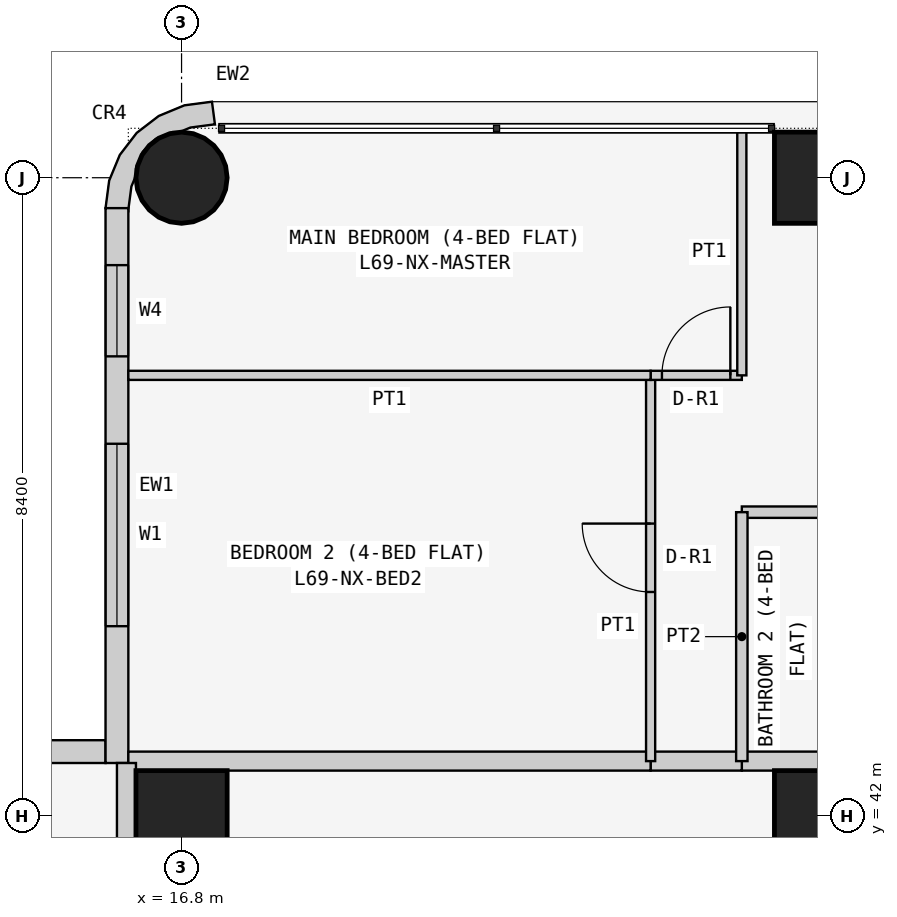
"""IFC4 building model, lengths in metres.
Left out: names, types, materials, properties, quantities, classifications, styles, units other than length and angle.
Written with IfcOpenShell. Run it as: python <this file> out.ifc"""

import sys

from ifc_helpers import new_model, si_unit, direction, frame, frame_2d, origin, origin_2d, place, context, subcontext, project, spatial, polyline, rectangle, circle, outline, extrude, element, fill, save


model = new_model("IFC4")
c1 = context("Model", 3, precision=1e-05, world=origin(), true_north=direction((0.0, 1.0)))
c2 = subcontext(c1, "Body", "Model", "MODEL_VIEW")
j1 = project(units=[si_unit("LENGTHUNIT", "METRE"), si_unit("PLANEANGLEUNIT", "RADIAN")], contexts=[c1])
p1 = place(None, origin())
s1 = spatial("IfcSite", under=j1, at=p1, CompositionType="ELEMENT")
p2 = place(p1, origin())
s2 = spatial("IfcBuilding", under=s1, at=p2, CompositionType="ELEMENT")
p3 = place(p2, frame((0.0, 0.0, 264.9)))
s3 = spatial("IfcBuildingStorey", under=s2, at=p3, CompositionType="ELEMENT", Elevation=264.9)
p4 = place(p3, frame((16.8, 42.0, 0.0), z_axis=(0.0, 0.0, 1.0), x_axis=(1.0, 0.0, 0.0)))
e1 = element("IfcColumn", 1, at=p4, inside=s3, PredefinedType="COLUMN", context=c2, shape_type="SweptSolid", body=[
    extrude(rectangle(XDim=1.2, YDim=1.2, at=origin_2d()), origin(), (0.0, 0.0, 1.0), 3.6),
])
p5 = place(p3, frame((16.8, 50.4, 0.0), z_axis=(0.0, 0.0, 1.0), x_axis=(1.0, 0.0, 0.0)))
e2 = element("IfcColumn", 2, at=p5, inside=s3, PredefinedType="COLUMN", context=c2, shape_type="SweptSolid", body=[
    extrude(circle(Radius=0.6, at=origin_2d()), origin(), (0.0, 0.0, 1.0), 3.6),
])
for number, where, z_axis, x_axis in (
    (3, (25.2, 42.0, 0.0), (0.0, 0.0, 1.0), (1.0, 0.0, 0.0)),
    (4, (25.2, 50.4, 0.0), (0.0, 0.0, 1.0), (1.0, 0.0, 0.0)),
):
    element("IfcColumn", number, at=place(p3, frame(where, z_axis=z_axis, x_axis=x_axis)), inside=s3, PredefinedType="COLUMN", context=c2, shape_type="SweptSolid", body=[
        extrude(rectangle(XDim=1.2, YDim=1.2, at=origin_2d()), origin(), (0.0, 0.0, 1.0), 3.6),
    ])
p6 = place(p3, frame((15.8, 42.85, 0.0), z_axis=(0.0, 0.0, 1.0), x_axis=(-1.0, 0.0, 0.0)))
e5 = element("IfcWall", 5, at=p6, inside=s3, PredefinedType="SOLIDWALL", context=c2, shape_type="SweptSolid", body=[
    extrude(rectangle(XDim=7.0, YDim=0.3, at=frame_2d((3.5, 0.0))), origin(), (0.0, 0.0, 1.0), 3.45),
])
p7 = place(p6, frame((1.5, 0.0, 0.9)))
e6 = element("IfcOpeningElement", 6, at=p7, cuts=e5, PredefinedType="OPENING", context=c2, shape_type="SweptSolid", body=[
    extrude(rectangle(XDim=2.4, YDim=1.5, at=frame_2d((1.2, 0.75))), frame((0.0, 0.16, 0.0), z_axis=(0.0, -1.0, 0.0), x_axis=(1.0, 0.0, 0.0)), (0.0, 0.0, 1.0), 0.32),
])
p8 = place(p6, frame((5.05, 0.0, 0.9)))
e7 = element("IfcOpeningElement", 7, at=p8, cuts=e5, PredefinedType="OPENING", context=c2, shape_type="SweptSolid", body=[
    extrude(rectangle(XDim=1.2, YDim=1.5, at=frame_2d((0.6, 0.75))), frame((0.0, 0.16, 0.0), z_axis=(0.0, -1.0, 0.0), x_axis=(1.0, 0.0, 0.0)), (0.0, 0.0, 1.0), 0.32),
])
p9 = place(p3, frame((15.95, 50.0, 0.0), z_axis=(0.0, 0.0, 1.0), x_axis=(0.0, -1.0, 0.0)))
e8 = element("IfcWall", 8, at=p9, inside=s3, PredefinedType="SOLIDWALL", context=c2, shape_type="SweptSolid", body=[
    extrude(rectangle(XDim=7.3, YDim=0.3, at=frame_2d((3.65, 0.0))), origin(), (0.0, 0.0, 1.0), 3.45),
])
p10 = place(p9, frame((3.1, 0.0, 0.9)))
e9 = element("IfcOpeningElement", 9, at=p10, cuts=e8, PredefinedType="OPENING", context=c2, shape_type="SweptSolid", body=[
    extrude(rectangle(XDim=2.4, YDim=1.5, at=frame_2d((1.2, 0.75))), frame((0.0, 0.16, 0.0), z_axis=(0.0, -1.0, 0.0), x_axis=(1.0, 0.0, 0.0)), (0.0, 0.0, 1.0), 0.32),
])
p11 = place(p9, frame((0.75, 0.0, 0.9)))
e10 = element("IfcOpeningElement", 10, at=p11, cuts=e8, PredefinedType="OPENING", context=c2, shape_type="SweptSolid", body=[
    extrude(rectangle(XDim=1.2, YDim=1.5, at=frame_2d((0.6, 0.75))), frame((0.0, 0.16, 0.0), z_axis=(0.0, -1.0, 0.0), x_axis=(1.0, 0.0, 0.0)), (0.0, 0.0, 1.0), 0.32),
])
p12 = place(p3, frame((17.162, 50.976, 0.0), z_axis=(0.0, 0.0, 1.0), x_axis=(-0.707106781187, 0.707106781187, 0.0)))
e11 = element("IfcWall", 11, at=p12, inside=s3, PredefinedType="SOLIDWALL", context=c2, shape_type="SweptSolid", body=[
    extrude(outline(polyline([(0.047, -0.129), (0.033, -0.143), (0.273, -0.327), (0.495, -0.037), (0.635, 0.301), (0.683, 0.663), (0.635, 1.025), (0.495, 1.363), (0.273, 1.653), (0.033, 1.469), (0.047, 1.455), (0.233, 1.212), (0.292, 1.069), (0.358, 1.003), (0.449, 0.782), (0.449, 0.543), (0.358, 0.322), (0.292, 0.257), (0.233, 0.114), (0.047, -0.129)])), origin(), (0.0, 0.0, 1.0), 3.45),
])
p13 = place(p3, frame((24.171, 42.725, 0.0), z_axis=(0.0, 0.0, 1.0), x_axis=(1.0, 0.0, 0.0)))
e12 = element("IfcWall", 12, at=p13, inside=s3, PredefinedType="PARTITIONING", context=c2, shape_type="SweptSolid", body=[
    extrude(rectangle(XDim=2.629, YDim=0.25, at=frame_2d((1.314, 0.0))), origin(), (0.0, 0.0, 1.0), 3.45),
])
p14 = place(p3, frame((22.971, 42.725, 0.0), z_axis=(0.0, 0.0, 1.0), x_axis=(1.0, 0.0, 0.0)))
e13 = element("IfcWall", 13, at=p14, inside=s3, PredefinedType="PARTITIONING", context=c2, shape_type="SweptSolid", body=[
    extrude(rectangle(XDim=1.2, YDim=0.25, at=frame_2d((0.6, 0.0))), origin(), (0.0, 0.0, 1.0), 3.45),
])
for number, where, z_axis, x_axis in (
    (14, (16.1, 42.725, 0.0), (0.0, 0.0, 1.0), (1.0, 0.0, 0.0)),
    (15, (16.075, 35.829, 0.0), (0.0, 0.0, 1.0), (0.0, 1.0, 0.0)),
):
    element("IfcWall", number, at=place(p3, frame(where, z_axis=z_axis, x_axis=x_axis)), inside=s3, PredefinedType="PARTITIONING", context=c2, shape_type="SweptSolid", body=[
        extrude(rectangle(XDim=6.871, YDim=0.25, at=frame_2d((3.436, 0.0))), origin(), (0.0, 0.0, 1.0), 3.45),
    ])
p15 = place(p3, frame((26.8, 46.0, 0.0), z_axis=(0.0, 0.0, 1.0), x_axis=(-1.0, 0.0, 0.0)))
e16 = element("IfcWall", 16, at=p15, inside=s3, PredefinedType="PARTITIONING", context=c2, shape_type="SweptSolid", body=[
    extrude(rectangle(XDim=2.629, YDim=0.15, at=frame_2d((1.314, 0.0))), origin(), (0.0, 0.0, 1.0), 3.45),
])
p16 = place(p3, frame((24.171, 46.0, 0.0), z_axis=(0.0, 0.0, 1.0), x_axis=(0.0, -1.0, 0.0)))
e17 = element("IfcWall", 17, at=p16, inside=s3, PredefinedType="PARTITIONING", context=c2, shape_type="SweptSolid", body=[
    extrude(rectangle(XDim=3.275, YDim=0.15, at=frame_2d((1.637, 0.0))), origin(), (0.0, 0.0, 1.0), 3.45),
])
p17 = place(p3, frame((22.971, 42.725, 0.0), z_axis=(0.0, 0.0, 1.0), x_axis=(0.0, 1.0, 0.0)))
e18 = element("IfcWall", 18, at=p17, inside=s3, PredefinedType="PARTITIONING", context=c2, shape_type="SweptSolid", body=[
    extrude(rectangle(XDim=5.075, YDim=0.12, at=frame_2d((2.538, 0.0))), origin(), (0.0, 0.0, 1.0), 3.45),
])
p18 = place(p17, frame((2.225, 0.0, 0.0)))
e19 = element("IfcOpeningElement", 19, at=p18, cuts=e18, PredefinedType="OPENING", context=c2, shape_type="SweptSolid", body=[
    extrude(rectangle(XDim=0.9, YDim=2.1, at=frame_2d((0.45, 1.05))), frame((0.0, 0.07, 0.0), z_axis=(0.0, -1.0, 0.0), x_axis=(1.0, 0.0, 0.0)), (0.0, 0.0, 1.0), 0.14),
])
p19 = place(p3, frame((22.971, 47.8, 0.0), z_axis=(0.0, 0.0, 1.0), x_axis=(1.0, 0.0, 0.0)))
e20 = element("IfcWall", 20, at=p19, inside=s3, PredefinedType="PARTITIONING", context=c2, shape_type="SweptSolid", body=[
    extrude(rectangle(XDim=1.2, YDim=0.12, at=frame_2d((0.6, 0.0))), origin(), (0.0, 0.0, 1.0), 3.45),
])
p20 = place(p19, frame((0.149, 0.0, 0.0)))
e21 = element("IfcOpeningElement", 21, at=p20, cuts=e20, PredefinedType="OPENING", context=c2, shape_type="SweptSolid", body=[
    extrude(rectangle(XDim=0.9, YDim=2.1, at=frame_2d((0.45, 1.05))), frame((0.0, 0.07, 0.0), z_axis=(0.0, -1.0, 0.0), x_axis=(1.0, 0.0, 0.0)), (0.0, 0.0, 1.0), 0.14),
])
p21 = place(p3, frame((24.171, 47.8, 0.0), z_axis=(0.0, 0.0, 1.0), x_axis=(0.0, 1.0, 0.0)))
e22 = element("IfcWall", 22, at=p21, inside=s3, PredefinedType="PARTITIONING", context=c2, shape_type="SweptSolid", body=[
    extrude(rectangle(XDim=3.25, YDim=0.12, at=frame_2d((1.625, 0.0))), origin(), (0.0, 0.0, 1.0), 3.45),
])
p22 = place(p3, frame((22.971, 47.8, 0.0), z_axis=(0.0, 0.0, 1.0), x_axis=(-1.0, 0.0, 0.0)))
e23 = element("IfcWall", 23, at=p22, inside=s3, PredefinedType="PARTITIONING", context=c2, shape_type="SweptSolid", body=[
    extrude(rectangle(XDim=6.871, YDim=0.12, at=frame_2d((3.436, 0.0))), origin(), (0.0, 0.0, 1.0), 3.45),
])
p23 = place(p10, origin())
e24 = element("IfcWindow", 24, at=p23, inside=s3, PartitioningType="SINGLE_PANEL", PredefinedType="WINDOW", context=c2, shape_type="SweptSolid", body=[
    extrude(rectangle(XDim=2.4, YDim=1.5, at=frame_2d((1.2, 0.75))), frame((0.0, 0.03, 0.0), z_axis=(0.0, -1.0, 0.0), x_axis=(1.0, 0.0, 0.0)), (0.0, 0.0, 1.0), 0.06),
])
fill(e9, e24)
p24 = place(p11, origin())
e25 = element("IfcWindow", 25, at=p24, inside=s3, PartitioningType="SINGLE_PANEL", PredefinedType="WINDOW", context=c2, shape_type="SweptSolid", body=[
    extrude(rectangle(XDim=1.2, YDim=1.5, at=frame_2d((0.6, 0.75))), frame((0.0, 0.03, 0.0), z_axis=(0.0, -1.0, 0.0), x_axis=(1.0, 0.0, 0.0)), (0.0, 0.0, 1.0), 0.06),
])
fill(e10, e25)
p25 = place(p18, origin())
e26 = element("IfcDoor", 26, at=p25, inside=s3, OperationType="SINGLE_SWING_RIGHT", PredefinedType="DOOR", context=c2, shape_type="SweptSolid", body=[
    extrude(rectangle(XDim=0.9, YDim=2.1, at=frame_2d((0.45, 1.05))), frame((0.0, 0.025, 0.0), z_axis=(0.0, -1.0, 0.0), x_axis=(1.0, 0.0, 0.0)), (0.0, 0.0, 1.0), 0.05),
])
fill(e19, e26)
p26 = place(p20, origin())
e27 = element("IfcDoor", 27, at=p26, inside=s3, OperationType="SINGLE_SWING_RIGHT", PredefinedType="DOOR", context=c2, shape_type="SweptSolid", body=[
    extrude(rectangle(XDim=0.9, YDim=2.1, at=frame_2d((0.45, 1.05))), frame((0.0, 0.025, 0.0), z_axis=(0.0, -1.0, 0.0), x_axis=(1.0, 0.0, 0.0)), (0.0, 0.0, 1.0), 0.05),
])
fill(e21, e27)
save(model, sys.argv[1])
